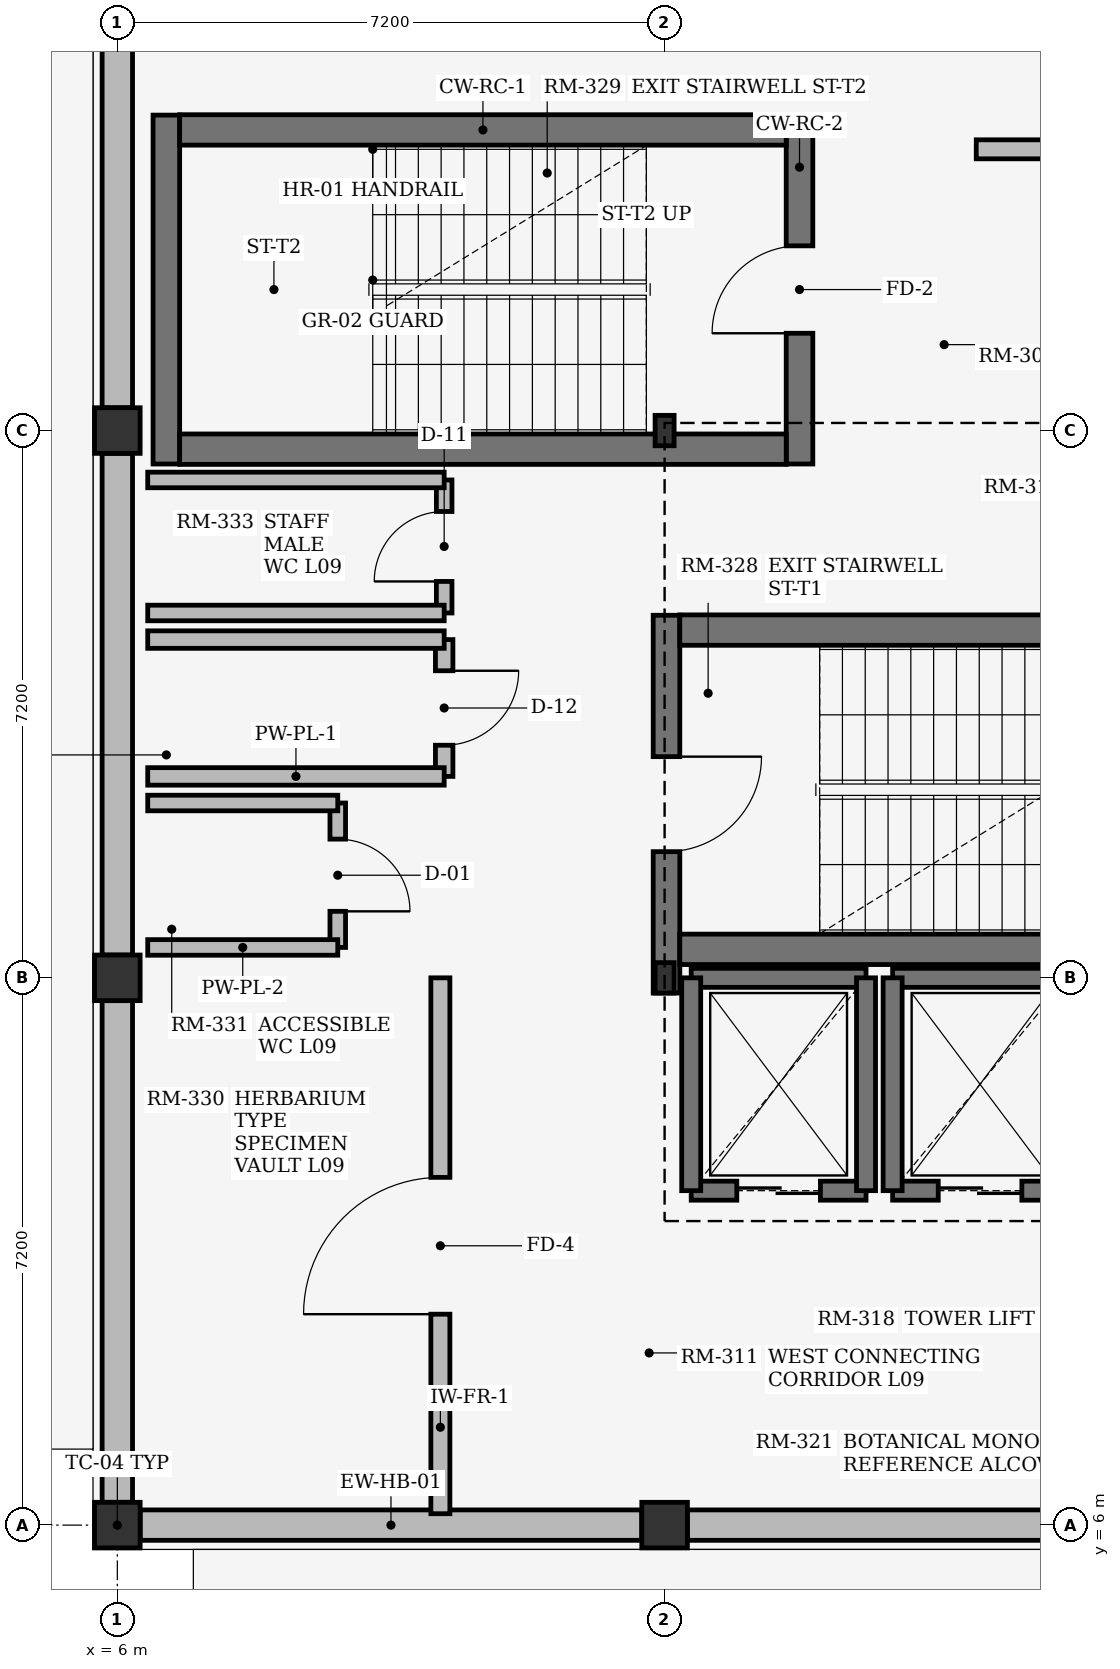
"""IFC4 building model, lengths in metres.
Left out: names, types, materials, properties, quantities, classifications, styles, units other than length and angle.
Written with IfcOpenShell. Run it as: python <this file> out.ifc"""

import sys

from ifc_helpers import new_model, si_unit, direction, frame, frame_2d, origin, origin_2d, place, context, subcontext, project, spatial, rectangle, i_section, extrude, element, fill, save


model = new_model("IFC4")
c1 = context("Model", 3, precision=1e-05, world=origin(), true_north=direction((0.0, 1.0)))
c2 = subcontext(c1, "Body", "Model", "MODEL_VIEW")
j1 = project(units=[si_unit("LENGTHUNIT", "METRE"), si_unit("PLANEANGLEUNIT", "RADIAN")], contexts=[c1])
p1 = place(None, origin())
s1 = spatial("IfcSite", under=j1, at=p1, CompositionType="ELEMENT")
p2 = place(p1, origin())
s2 = spatial("IfcBuilding", under=s1, at=p2, CompositionType="ELEMENT")
p3 = place(p2, frame((0.0, 0.0, 36.6)))
s3 = spatial("IfcBuildingStorey", under=s2, at=p3, CompositionType="ELEMENT", Elevation=36.6)
for number, where, z_axis, x_axis in (
    (1, (6.0, 6.0, 0.0), (0.0, 0.0, 1.0), (1.0, 0.0, 0.0)),
    (2, (6.0, 13.2, 0.0), (0.0, 0.0, 1.0), (1.0, 0.0, 0.0)),
    (3, (6.0, 20.4, 0.0), (0.0, 0.0, 1.0), (1.0, 0.0, 0.0)),
    (4, (13.2, 6.0, 0.0), (0.0, 0.0, 1.0), (1.0, 0.0, 0.0)),
):
    element("IfcColumn", number, at=place(p3, frame(where, z_axis=z_axis, x_axis=x_axis)), inside=s3, PredefinedType="COLUMN", context=c2, shape_type="SweptSolid", body=[
        extrude(rectangle(XDim=0.6, YDim=0.6, at=origin_2d()), origin(), (0.0, 0.0, 1.0), 3.62),
    ])
for number, where, z_axis, x_axis in (
    (5, (13.2, 13.2, 0.0), (0.0, 0.0, 1.0), (1.0, 0.0, 0.0)),
    (6, (13.2, 20.4, 0.0), (0.0, 0.0, 1.0), (1.0, 0.0, 0.0)),
):
    element("IfcColumn", number, at=place(p3, frame(where, z_axis=z_axis, x_axis=x_axis)), inside=s3, PredefinedType="COLUMN", context=c2, shape_type="SweptSolid", body=[
        extrude(i_section(OverallWidth=0.25, OverallDepth=0.4, WebThickness=0.01, FlangeThickness=0.013, at=origin_2d()), origin(), (0.0, 0.0, 1.0), 3.62),
    ])
p4 = place(p3, frame((6.3, 6.0, 0.0), z_axis=(0.0, 0.0, 1.0), x_axis=(1.0, 0.0, 0.0)))
e7 = element("IfcWall", 7, at=p4, inside=s3, PredefinedType="STANDARD", context=c2, shape_type="SweptSolid", body=[
    extrude(rectangle(XDim=6.6, YDim=0.4, at=frame_2d((3.3, 0.0))), origin(), (0.0, 0.0, 1.0), 3.1),
])
p5 = place(p3, frame((13.5, 6.0, 0.0), z_axis=(0.0, 0.0, 1.0), x_axis=(1.0, 0.0, 0.0)))
e8 = element("IfcWall", 8, at=p5, inside=s3, PredefinedType="STANDARD", context=c2, shape_type="SweptSolid", body=[
    extrude(rectangle(XDim=6.6, YDim=0.4, at=frame_2d((3.3, 0.0))), origin(), (0.0, 0.0, 1.0), 3.1),
])
p6 = place(p3, frame((6.0, 6.3, 0.0), z_axis=(0.0, 0.0, 1.0), x_axis=(0.0, 1.0, 0.0)))
e9 = element("IfcWall", 9, at=p6, inside=s3, PredefinedType="STANDARD", context=c2, shape_type="SweptSolid", body=[
    extrude(rectangle(XDim=6.6, YDim=0.4, at=frame_2d((3.3, 0.0))), origin(), (0.0, 0.0, 1.0), 3.1),
])
for number, where, z_axis, x_axis in (
    (10, (6.0, 13.5, 0.0), (0.0, 0.0, 1.0), (0.0, 1.0, 0.0)),
    (11, (6.0, 20.7, 0.0), (0.0, 0.0, 1.0), (0.0, 1.0, 0.0)),
):
    element("IfcWall", number, at=place(p3, frame(where, z_axis=z_axis, x_axis=x_axis)), inside=s3, PredefinedType="STANDARD", context=c2, shape_type="SweptSolid", body=[
        extrude(rectangle(XDim=6.6, YDim=0.4, at=frame_2d((3.3, 0.0))), origin(), (0.0, 0.0, 1.0), 3.1),
    ])
p7 = place(p3, frame((13.225, 13.0, 0.0), z_axis=(0.0, 0.0, 1.0), x_axis=(0.0, 1.0, 0.0)))
e12 = element("IfcWall", 12, at=p7, inside=s3, PredefinedType="SHEAR", context=c2, shape_type="SweptSolid", body=[
    extrude(rectangle(XDim=4.97, YDim=0.35, at=frame_2d((2.485, 0.0))), origin(), (0.0, 0.0, 1.0), 3.62),
])
p8 = place(p7, frame((1.86, 0.0, 0.0)))
e13 = element("IfcOpeningElement", 13, at=p8, cuts=e12, PredefinedType="OPENING", context=c2, shape_type="SweptSolid", body=[
    extrude(rectangle(XDim=1.25, YDim=2.2, at=frame_2d((0.625, 1.1))), frame((0.0, 0.185, 0.0), z_axis=(0.0, -1.0, 0.0), x_axis=(1.0, 0.0, 0.0)), (0.0, 0.0, 1.0), 0.37),
])
for number, where, z_axis, x_axis in (
    (14, (13.4, 13.575, 0.0), (0.0, 0.0, 1.0), (1.0, 0.0, 0.0)),
    (15, (13.4, 17.775, 0.0), (0.0, 0.0, 1.0), (1.0, 0.0, 0.0)),
):
    element("IfcWall", number, at=place(p3, frame(where, z_axis=z_axis, x_axis=x_axis)), inside=s3, PredefinedType="SHEAR", context=c2, shape_type="SweptSolid", body=[
        extrude(rectangle(XDim=7.98, YDim=0.4, at=frame_2d((3.99, 0.0))), origin(), (0.0, 0.0, 1.0), 3.62),
    ])
p9 = place(p3, frame((14.975, 24.55, 0.0), z_axis=(0.0, 0.0, 1.0), x_axis=(0.0, -1.0, 0.0)))
e16 = element("IfcWall", 16, at=p9, inside=s3, PredefinedType="SHEAR", context=c2, shape_type="SweptSolid", body=[
    extrude(rectangle(XDim=4.59, YDim=0.35, at=frame_2d((2.295, 0.0))), origin(), (0.0, 0.0, 1.0), 3.62),
])
p10 = place(p9, frame((1.72, 0.0, 0.0)))
e17 = element("IfcOpeningElement", 17, at=p10, cuts=e16, PredefinedType="OPENING", context=c2, shape_type="SweptSolid", body=[
    extrude(rectangle(XDim=1.15, YDim=2.2, at=frame_2d((0.575, 1.1))), frame((0.0, 0.185, 0.0), z_axis=(0.0, -1.0, 0.0), x_axis=(1.0, 0.0, 0.0)), (0.0, 0.0, 1.0), 0.37),
])
p11 = place(p3, frame((6.645, 24.55, 0.0), z_axis=(0.0, 0.0, 1.0), x_axis=(0.0, -1.0, 0.0)))
e18 = element("IfcWall", 18, at=p11, inside=s3, PredefinedType="SHEAR", context=c2, shape_type="SweptSolid", body=[
    extrude(rectangle(XDim=4.59, YDim=0.35, at=frame_2d((2.295, 0.0))), origin(), (0.0, 0.0, 1.0), 3.62),
])
for number, where, z_axis, x_axis in (
    (19, (14.8, 24.355, 0.0), (0.0, 0.0, 1.0), (-1.0, 0.0, 0.0)),
    (20, (14.8, 20.155, 0.0), (0.0, 0.0, 1.0), (-1.0, 0.0, 0.0)),
):
    element("IfcWall", number, at=place(p3, frame(where, z_axis=z_axis, x_axis=x_axis)), inside=s3, PredefinedType="SHEAR", context=c2, shape_type="SweptSolid", body=[
        extrude(rectangle(XDim=7.98, YDim=0.4, at=frame_2d((3.99, 0.0))), origin(), (0.0, 0.0, 1.0), 3.62),
    ])
p12 = place(p3, frame((13.55, 10.4, 0.0), z_axis=(0.0, 0.0, 1.0), x_axis=(1.0, 0.0, 0.0)))
e21 = element("IfcWall", 21, at=p12, inside=s3, PredefinedType="SHEAR", context=c2, shape_type="SweptSolid", body=[
    extrude(rectangle(XDim=2.3, YDim=0.25, at=frame_2d((1.15, 0.0))), origin(), (0.0, 0.0, 1.0), 3.62),
])
p13 = place(p12, frame((0.6, 0.0, 0.0)))
e22 = element("IfcOpeningElement", 22, at=p13, cuts=e21, PredefinedType="OPENING", context=c2, shape_type="SweptSolid", body=[
    extrude(rectangle(XDim=1.1, YDim=2.2, at=frame_2d((0.55, 1.1))), frame((0.0, 0.135, 0.0), z_axis=(0.0, -1.0, 0.0), x_axis=(1.0, 0.0, 0.0)), (0.0, 0.0, 1.0), 0.27),
])
p14 = place(p3, frame((13.55, 13.2, 0.0), z_axis=(0.0, 0.0, 1.0), x_axis=(1.0, 0.0, 0.0)))
e23 = element("IfcWall", 23, at=p14, inside=s3, PredefinedType="SHEAR", context=c2, shape_type="SweptSolid", body=[
    extrude(rectangle(XDim=2.3, YDim=0.25, at=frame_2d((1.15, 0.0))), origin(), (0.0, 0.0, 1.0), 3.62),
])
for number, where, z_axis, x_axis in (
    (24, (13.55, 10.4, 0.0), (0.0, 0.0, 1.0), (0.0, 1.0, 0.0)),
    (25, (15.85, 10.4, 0.0), (0.0, 0.0, 1.0), (0.0, 1.0, 0.0)),
):
    element("IfcWall", number, at=place(p3, frame(where, z_axis=z_axis, x_axis=x_axis)), inside=s3, PredefinedType="SHEAR", context=c2, shape_type="SweptSolid", body=[
        extrude(rectangle(XDim=2.8, YDim=0.25, at=frame_2d((1.4, 0.0))), origin(), (0.0, 0.0, 1.0), 3.62),
    ])
p15 = place(p3, frame((16.2, 10.4, 0.0), z_axis=(0.0, 0.0, 1.0), x_axis=(1.0, 0.0, 0.0)))
e26 = element("IfcWall", 26, at=p15, inside=s3, PredefinedType="SHEAR", context=c2, shape_type="SweptSolid", body=[
    extrude(rectangle(XDim=2.3, YDim=0.25, at=frame_2d((1.15, 0.0))), origin(), (0.0, 0.0, 1.0), 3.62),
])
p16 = place(p15, frame((0.6, 0.0, 0.0)))
e27 = element("IfcOpeningElement", 27, at=p16, cuts=e26, PredefinedType="OPENING", context=c2, shape_type="SweptSolid", body=[
    extrude(rectangle(XDim=1.1, YDim=2.2, at=frame_2d((0.55, 1.1))), frame((0.0, 0.135, 0.0), z_axis=(0.0, -1.0, 0.0), x_axis=(1.0, 0.0, 0.0)), (0.0, 0.0, 1.0), 0.27),
])
p17 = place(p3, frame((16.2, 13.2, 0.0), z_axis=(0.0, 0.0, 1.0), x_axis=(1.0, 0.0, 0.0)))
e28 = element("IfcWall", 28, at=p17, inside=s3, PredefinedType="SHEAR", context=c2, shape_type="SweptSolid", body=[
    extrude(rectangle(XDim=2.3, YDim=0.25, at=frame_2d((1.15, 0.0))), origin(), (0.0, 0.0, 1.0), 3.62),
])
p18 = place(p3, frame((16.2, 10.4, 0.0), z_axis=(0.0, 0.0, 1.0), x_axis=(0.0, 1.0, 0.0)))
e29 = element("IfcWall", 29, at=p18, inside=s3, PredefinedType="SHEAR", context=c2, shape_type="SweptSolid", body=[
    extrude(rectangle(XDim=2.8, YDim=0.25, at=frame_2d((1.4, 0.0))), origin(), (0.0, 0.0, 1.0), 3.62),
])
p19 = place(p3, frame((8.9, 13.6, 0.0), z_axis=(0.0, 0.0, 1.0), x_axis=(0.0, 1.0, 0.0)))
e30 = element("IfcWall", 30, at=p19, inside=s3, PredefinedType="PLUMBINGWALL", context=c2, shape_type="SweptSolid", body=[
    extrude(rectangle(XDim=1.9, YDim=0.205, at=frame_2d((0.95, 0.0))), origin(), (0.0, 0.0, 1.0), 3.6),
])
p20 = place(p19, frame((0.475, 0.0, 0.0)))
e31 = element("IfcOpeningElement", 31, at=p20, cuts=e30, PredefinedType="OPENING", context=c2, shape_type="SweptSolid", body=[
    extrude(rectangle(XDim=0.95, YDim=2.15, at=frame_2d((0.475, 1.075))), frame((0.0, 0.113, 0.0), z_axis=(0.0, -1.0, 0.0), x_axis=(1.0, 0.0, 0.0)), (0.0, 0.0, 1.0), 0.225),
])
for number, where, z_axis, x_axis in (
    (32, (6.4, 13.6, 0.0), (0.0, 0.0, 1.0), (1.0, 0.0, 0.0)),
    (33, (6.4, 15.5, 0.0), (0.0, 0.0, 1.0), (1.0, 0.0, 0.0)),
):
    element("IfcWall", number, at=place(p3, frame(where, z_axis=z_axis, x_axis=x_axis)), inside=s3, PredefinedType="PLUMBINGWALL", context=c2, shape_type="SweptSolid", body=[
        extrude(rectangle(XDim=2.5, YDim=0.205, at=frame_2d((1.25, 0.0))), origin(), (0.0, 0.0, 1.0), 3.6),
    ])
p21 = place(p3, frame((10.3, 15.85, 0.0), z_axis=(0.0, 0.0, 1.0), x_axis=(0.0, 1.0, 0.0)))
e34 = element("IfcWall", 34, at=p21, inside=s3, PredefinedType="PLUMBINGWALL", context=c2, shape_type="SweptSolid", body=[
    extrude(rectangle(XDim=1.8, YDim=0.23, at=frame_2d((0.9, 0.0))), origin(), (0.0, 0.0, 1.0), 3.6),
])
p22 = place(p21, frame((0.41, 0.0, 0.0)))
e35 = element("IfcOpeningElement", 35, at=p22, cuts=e34, PredefinedType="OPENING", context=c2, shape_type="SweptSolid", body=[
    extrude(rectangle(XDim=0.98, YDim=2.1, at=frame_2d((0.49, 1.05))), frame((0.0, 0.125, 0.0), z_axis=(0.0, -1.0, 0.0), x_axis=(1.0, 0.0, 0.0)), (0.0, 0.0, 1.0), 0.25),
])
for number, where, z_axis, x_axis in (
    (36, (6.4, 15.85, 0.0), (0.0, 0.0, 1.0), (1.0, 0.0, 0.0)),
    (37, (6.4, 17.65, 0.0), (0.0, 0.0, 1.0), (1.0, 0.0, 0.0)),
):
    element("IfcWall", number, at=place(p3, frame(where, z_axis=z_axis, x_axis=x_axis)), inside=s3, PredefinedType="PLUMBINGWALL", context=c2, shape_type="SweptSolid", body=[
        extrude(rectangle(XDim=3.9, YDim=0.23, at=frame_2d((1.95, 0.0))), origin(), (0.0, 0.0, 1.0), 3.6),
    ])
p23 = place(p3, frame((10.3, 18.0, 0.0), z_axis=(0.0, 0.0, 1.0), x_axis=(0.0, 1.0, 0.0)))
e38 = element("IfcWall", 38, at=p23, inside=s3, PredefinedType="PLUMBINGWALL", context=c2, shape_type="SweptSolid", body=[
    extrude(rectangle(XDim=1.75, YDim=0.205, at=frame_2d((0.875, 0.0))), origin(), (0.0, 0.0, 1.0), 3.6),
])
p24 = place(p23, frame((0.415, 0.0, 0.0)))
e39 = element("IfcOpeningElement", 39, at=p24, cuts=e38, PredefinedType="OPENING", context=c2, shape_type="SweptSolid", body=[
    extrude(rectangle(XDim=0.92, YDim=2.1, at=frame_2d((0.46, 1.05))), frame((0.0, 0.113, 0.0), z_axis=(0.0, -1.0, 0.0), x_axis=(1.0, 0.0, 0.0)), (0.0, 0.0, 1.0), 0.225),
])
for number, where, z_axis, x_axis in (
    (40, (6.4, 18.0, 0.0), (0.0, 0.0, 1.0), (1.0, 0.0, 0.0)),
    (41, (6.4, 19.75, 0.0), (0.0, 0.0, 1.0), (1.0, 0.0, 0.0)),
):
    element("IfcWall", number, at=place(p3, frame(where, z_axis=z_axis, x_axis=x_axis)), inside=s3, PredefinedType="PLUMBINGWALL", context=c2, shape_type="SweptSolid", body=[
        extrude(rectangle(XDim=3.9, YDim=0.205, at=frame_2d((1.95, 0.0))), origin(), (0.0, 0.0, 1.0), 3.6),
    ])
p25 = place(p3, frame((17.3, 24.1, 0.0), z_axis=(0.0, 0.0, 1.0), x_axis=(1.0, 0.0, 0.0)))
e42 = element("IfcWall", 42, at=p25, inside=s3, PredefinedType="SOLIDWALL", context=c2, shape_type="SweptSolid", body=[
    extrude(rectangle(XDim=4.0, YDim=0.25, at=frame_2d((2.0, 0.0))), origin(), (0.0, 0.0, 1.0), 3.6),
])
p26 = place(p25, frame((1.1, 0.0, 0.0)))
e43 = element("IfcOpeningElement", 43, at=p26, cuts=e42, PredefinedType="OPENING", context=c2, shape_type="SweptSolid", body=[
    extrude(rectangle(XDim=1.8, YDim=2.25, at=frame_2d((0.9, 1.125))), frame((0.0, 0.135, 0.0), z_axis=(0.0, -1.0, 0.0), x_axis=(1.0, 0.0, 0.0)), (0.0, 0.0, 1.0), 0.27),
])
p27 = place(p3, frame((10.25, 6.15, 0.0), z_axis=(0.0, 0.0, 1.0), x_axis=(0.0, 1.0, 0.0)))
e44 = element("IfcWall", 44, at=p27, inside=s3, PredefinedType="SOLIDWALL", context=c2, shape_type="SweptSolid", body=[
    extrude(rectangle(XDim=7.05, YDim=0.25, at=frame_2d((3.525, 0.0))), origin(), (0.0, 0.0, 1.0), 3.6),
])
p28 = place(p27, frame((2.625, 0.0, 0.0)))
e45 = element("IfcOpeningElement", 45, at=p28, cuts=e44, PredefinedType="OPENING", context=c2, shape_type="SweptSolid", body=[
    extrude(rectangle(XDim=1.8, YDim=2.25, at=frame_2d((0.9, 1.125))), frame((0.0, 0.135, 0.0), z_axis=(0.0, -1.0, 0.0), x_axis=(1.0, 0.0, 0.0)), (0.0, 0.0, 1.0), 0.27),
])
p29 = place(p8, origin())
e46 = element("IfcDoor", 46, at=p29, inside=s3, OperationType="SINGLE_SWING_RIGHT", PredefinedType="DOOR", context=c2, shape_type="SweptSolid", body=[
    extrude(rectangle(XDim=1.25, YDim=2.2, at=frame_2d((0.625, 1.1))), frame((0.0, 0.025, 0.0), z_axis=(0.0, -1.0, 0.0), x_axis=(1.0, 0.0, 0.0)), (0.0, 0.0, 1.0), 0.05),
])
fill(e13, e46)
p30 = place(p10, origin())
e47 = element("IfcDoor", 47, at=p30, inside=s3, OperationType="SINGLE_SWING_RIGHT", PredefinedType="DOOR", context=c2, shape_type="SweptSolid", body=[
    extrude(rectangle(XDim=1.15, YDim=2.2, at=frame_2d((0.575, 1.1))), frame((0.0, 0.025, 0.0), z_axis=(0.0, -1.0, 0.0), x_axis=(1.0, 0.0, 0.0)), (0.0, 0.0, 1.0), 0.05),
])
fill(e17, e47)
p31 = place(p13, origin())
e48 = element("IfcDoor", 48, at=p31, inside=s3, OperationType="DOUBLE_DOOR_SLIDING", PredefinedType="DOOR", context=c2, shape_type="SweptSolid", body=[
    extrude(rectangle(XDim=1.1, YDim=2.2, at=frame_2d((0.55, 1.1))), frame((0.0, 0.025, 0.0), z_axis=(0.0, -1.0, 0.0), x_axis=(1.0, 0.0, 0.0)), (0.0, 0.0, 1.0), 0.05),
])
fill(e22, e48)
p32 = place(p16, origin())
e49 = element("IfcDoor", 49, at=p32, inside=s3, OperationType="DOUBLE_DOOR_SLIDING", PredefinedType="DOOR", context=c2, shape_type="SweptSolid", body=[
    extrude(rectangle(XDim=1.1, YDim=2.2, at=frame_2d((0.55, 1.1))), frame((0.0, 0.025, 0.0), z_axis=(0.0, -1.0, 0.0), x_axis=(1.0, 0.0, 0.0)), (0.0, 0.0, 1.0), 0.05),
])
fill(e27, e49)
p33 = place(p20, frame((0.95, 0.0, 0.0), z_axis=(0.0, 0.0, 1.0), x_axis=(-1.0, 0.0, 0.0)))
e50 = element("IfcDoor", 50, at=p33, inside=s3, OperationType="SINGLE_SWING_LEFT", PredefinedType="DOOR", context=c2, shape_type="SweptSolid", body=[
    extrude(rectangle(XDim=0.95, YDim=2.15, at=frame_2d((0.475, 1.075))), frame((0.0, 0.025, 0.0), z_axis=(0.0, -1.0, 0.0), x_axis=(1.0, 0.0, 0.0)), (0.0, 0.0, 1.0), 0.05),
])
fill(e31, e50)
p34 = place(p22, origin())
e51 = element("IfcDoor", 51, at=p34, inside=s3, OperationType="SINGLE_SWING_RIGHT", PredefinedType="DOOR", context=c2, shape_type="SweptSolid", body=[
    extrude(rectangle(XDim=0.98, YDim=2.1, at=frame_2d((0.49, 1.05))), frame((0.0, 0.025, 0.0), z_axis=(0.0, -1.0, 0.0), x_axis=(1.0, 0.0, 0.0)), (0.0, 0.0, 1.0), 0.05),
])
fill(e35, e51)
p35 = place(p24, origin())
e52 = element("IfcDoor", 52, at=p35, inside=s3, OperationType="SINGLE_SWING_LEFT", PredefinedType="DOOR", context=c2, shape_type="SweptSolid", body=[
    extrude(rectangle(XDim=0.92, YDim=2.1, at=frame_2d((0.46, 1.05))), frame((0.0, 0.025, 0.0), z_axis=(0.0, -1.0, 0.0), x_axis=(1.0, 0.0, 0.0)), (0.0, 0.0, 1.0), 0.05),
])
fill(e39, e52)
p36 = place(p28, origin())
e53 = element("IfcDoor", 53, at=p36, inside=s3, OperationType="DOUBLE_DOOR_SINGLE_SWING", PredefinedType="DOOR", context=c2, shape_type="SweptSolid", body=[
    extrude(rectangle(XDim=1.8, YDim=2.25, at=frame_2d((0.9, 1.125))), frame((0.0, 0.025, 0.0), z_axis=(0.0, -1.0, 0.0), x_axis=(1.0, 0.0, 0.0)), (0.0, 0.0, 1.0), 0.05),
])
fill(e45, e53)
save(model, sys.argv[1])
